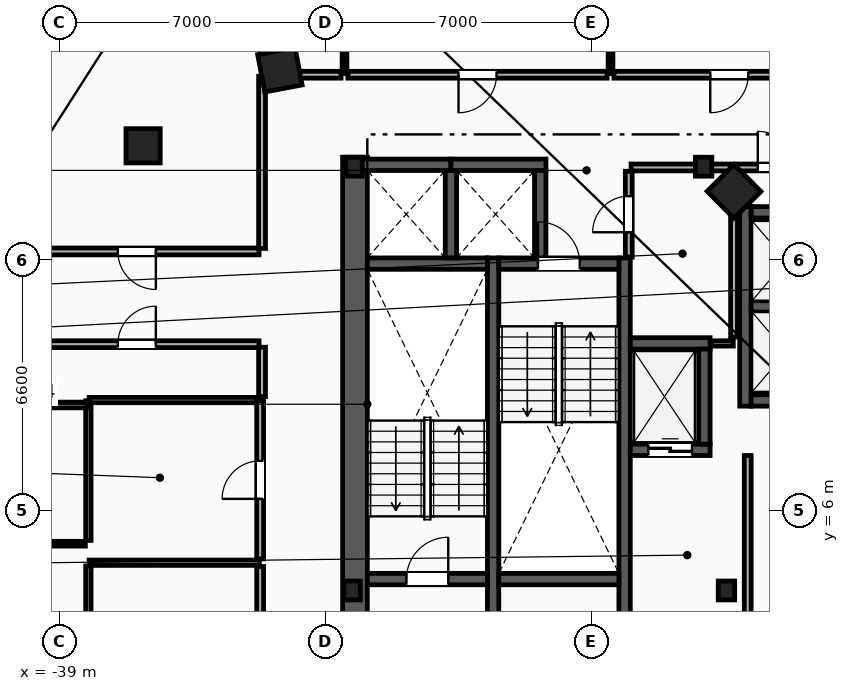
"""IFC4 building model, lengths in metres.
Left out: names, types, materials, properties, quantities, classifications, styles, units other than length and angle.
Written with IfcOpenShell. Run it as: python <this file> out.ifc"""

import sys

from ifc_helpers import new_model, si_unit, direction, frame, frame_2d, origin, origin_2d, place, context, subcontext, project, spatial, rectangle, i_section, extrude, element, fill, save


model = new_model("IFC4")
c1 = context("Model", 3, precision=1e-05, world=origin(), true_north=direction((0.0, 1.0)))
c2 = subcontext(c1, "Body", "Model", "MODEL_VIEW")
j1 = project(units=[si_unit("LENGTHUNIT", "METRE"), si_unit("PLANEANGLEUNIT", "RADIAN")], contexts=[c1])
p1 = place(None, origin())
s1 = spatial("IfcSite", under=j1, at=p1, CompositionType="ELEMENT")
p2 = place(p1, origin())
s2 = spatial("IfcBuilding", under=s1, at=p2, CompositionType="ELEMENT")
p3 = place(p2, frame((0.0, 0.0, 169.2)))
s3 = spatial("IfcBuildingStorey", under=s2, at=p3, CompositionType="ELEMENT", Elevation=169.2)
for number, where, z_axis, x_axis in (
    (1, (-31.3, 3.9, 0.0), (0.0, 0.0, 1.0), (1.0, 0.0, 0.0)),
    (2, (-21.45, 3.9, 0.0), (0.0, 0.0, 1.0), (1.0, 0.0, 0.0)),
    (3, (-22.05, 15.05, 0.0), (0.0, 0.0, 1.0), (1.0, 0.0, 0.0)),
    (4, (-31.25, 15.05, 0.0), (0.0, 0.0, 1.0), (1.0, 0.0, 0.0)),
):
    element("IfcColumn", number, at=place(p3, frame(where, z_axis=z_axis, x_axis=x_axis)), inside=s3, PredefinedType="COLUMN", context=c2, shape_type="SweptSolid", body=[
        extrude(i_section(OverallWidth=0.432, OverallDepth=0.498, WebThickness=0.056, FlangeThickness=0.089, FilletRadius=0.018, at=origin_2d()), origin(), (0.0, 0.0, 1.0), 3.6),
    ])
p4 = place(p3, frame((-36.8, 15.6, 0.0), z_axis=(0.0, 0.0, 1.0), x_axis=(1.0, 0.0, 0.0)))
e5 = element("IfcColumn", 5, at=p4, inside=s3, PredefinedType="COLUMN", context=c2, shape_type="SweptSolid", body=[
    extrude(rectangle(XDim=0.9, YDim=0.9, at=origin_2d()), origin(), (0.0, 0.0, 1.0), 3.6),
])
for number, where, z_axis, x_axis in (
    (6, (-21.25, 14.4, 0.0), (0.0, 0.0, 1.0), (-0.703, 0.711, 0.0)),
    (7, (-33.2, 17.6, 0.0), (0.0, 0.0, 1.0), (-0.983, -0.186, 0.0)),
):
    element("IfcColumn", number, at=place(p3, frame(where, z_axis=z_axis, x_axis=x_axis)), inside=s3, PredefinedType="COLUMN", context=c2, shape_type="SweptSolid", body=[
        extrude(rectangle(XDim=1.0, YDim=1.0, at=origin_2d()), origin(), (0.0, 0.0, 1.0), 3.6),
    ])
p5 = place(p3, frame((-31.225, 1.97, 0.0), z_axis=(0.0, 0.0, 1.0), x_axis=(0.0, 1.0, 0.0)))
e8 = element("IfcWall", 8, at=p5, inside=s3, PredefinedType="SHEAR", context=c2, shape_type="SweptSolid", body=[
    extrude(rectangle(XDim=13.33, YDim=0.65, at=frame_2d((6.665, 0.0))), origin(), (0.0, 0.0, 1.0), 3.36),
])
for number, where, z_axis, x_axis in (
    (9, (-27.59, 1.97, 0.0), (0.0, 0.0, 1.0), (0.0, 1.0, 0.0)),
    (10, (-24.13, 1.97, 0.0), (0.0, 0.0, 1.0), (0.0, 1.0, 0.0)),
):
    element("IfcWall", number, at=place(p3, frame(where, z_axis=z_axis, x_axis=x_axis)), inside=s3, PredefinedType="SHEAR", context=c2, shape_type="SweptSolid", body=[
        extrude(rectangle(XDim=10.68, YDim=0.3, at=frame_2d((5.34, 0.0))), origin(), (0.0, 0.0, 1.0), 3.36),
    ])
p6 = place(p3, frame((-30.9, 4.2, 0.0), z_axis=(0.0, 0.0, 1.0), x_axis=(1.0, 0.0, 0.0)))
e11 = element("IfcWall", 11, at=p6, inside=s3, PredefinedType="SHEAR", context=c2, shape_type="SweptSolid", body=[
    extrude(rectangle(XDim=3.16, YDim=0.3, at=frame_2d((1.58, 0.0))), origin(), (0.0, 0.0, 1.0), 3.36),
])
p7 = place(p6, frame((1.03, 0.0, 0.0)))
e12 = element("IfcOpeningElement", 12, at=p7, cuts=e11, PredefinedType="OPENING", context=c2, shape_type="SweptSolid", body=[
    extrude(rectangle(XDim=1.1, YDim=2.15, at=frame_2d((0.55, 1.075))), frame((0.0, 0.16, 0.0), z_axis=(0.0, -1.0, 0.0), x_axis=(1.0, 0.0, 0.0)), (0.0, 0.0, 1.0), 0.32),
])
p8 = place(p3, frame((-30.9, 12.5, 0.0), z_axis=(0.0, 0.0, 1.0), x_axis=(1.0, 0.0, 0.0)))
e13 = element("IfcWall", 13, at=p8, inside=s3, PredefinedType="SHEAR", context=c2, shape_type="SweptSolid", body=[
    extrude(rectangle(XDim=3.16, YDim=0.3, at=frame_2d((1.58, 0.0))), origin(), (0.0, 0.0, 1.0), 3.36),
])
p9 = place(p3, frame((-27.44, 12.5, 0.0), z_axis=(0.0, 0.0, 1.0), x_axis=(1.0, 0.0, 0.0)))
e14 = element("IfcWall", 14, at=p9, inside=s3, PredefinedType="SHEAR", context=c2, shape_type="SweptSolid", body=[
    extrude(rectangle(XDim=3.16, YDim=0.3, at=frame_2d((1.58, 0.0))), origin(), (0.0, 0.0, 1.0), 3.36),
])
p10 = place(p9, frame((1.03, 0.0, 0.0)))
e15 = element("IfcOpeningElement", 15, at=p10, cuts=e14, PredefinedType="OPENING", context=c2, shape_type="SweptSolid", body=[
    extrude(rectangle(XDim=1.1, YDim=2.15, at=frame_2d((0.55, 1.075))), frame((0.0, 0.16, 0.0), z_axis=(0.0, -1.0, 0.0), x_axis=(1.0, 0.0, 0.0)), (0.0, 0.0, 1.0), 0.32),
])
p11 = place(p3, frame((-27.44, 4.2, 0.0), z_axis=(0.0, 0.0, 1.0), x_axis=(1.0, 0.0, 0.0)))
e16 = element("IfcWall", 16, at=p11, inside=s3, PredefinedType="SHEAR", context=c2, shape_type="SweptSolid", body=[
    extrude(rectangle(XDim=3.16, YDim=0.3, at=frame_2d((1.58, 0.0))), origin(), (0.0, 0.0, 1.0), 3.36),
])
p12 = place(p3, frame((-20.89, 2.15, 0.0), z_axis=(0.0, 0.0, 1.0), x_axis=(0.0, 1.0, 0.0)))
e17 = element("IfcWall", 17, at=p12, inside=s3, PredefinedType="PARTITIONING", context=c2, shape_type="SweptSolid", body=[
    extrude(rectangle(XDim=5.3, YDim=0.18, at=frame_2d((2.65, 0.0))), origin(), (0.0, 0.0, 1.0), 3.36),
])
p13 = place(p3, frame((-23.98, 7.6, 0.0), z_axis=(0.0, 0.0, 1.0), x_axis=(1.0, 0.0, 0.0)))
e18 = element("IfcWall", 18, at=p13, inside=s3, PredefinedType="SHEAR", context=c2, shape_type="SweptSolid", body=[
    extrude(rectangle(XDim=2.1, YDim=0.3, at=frame_2d((1.05, 0.0))), origin(), (0.0, 0.0, 1.0), 3.36),
])
p14 = place(p13, frame((0.475, 0.0, 0.0)))
e19 = element("IfcOpeningElement", 19, at=p14, cuts=e18, PredefinedType="OPENING", context=c2, shape_type="SweptSolid", body=[
    extrude(rectangle(XDim=1.15, YDim=2.2, at=frame_2d((0.575, 1.1))), frame((0.0, 0.16, 0.0), z_axis=(0.0, -1.0, 0.0), x_axis=(1.0, 0.0, 0.0)), (0.0, 0.0, 1.0), 0.32),
])
p15 = place(p3, frame((-23.98, 10.4, 0.0), z_axis=(0.0, 0.0, 1.0), x_axis=(1.0, 0.0, 0.0)))
e20 = element("IfcWall", 20, at=p15, inside=s3, PredefinedType="SHEAR", context=c2, shape_type="SweptSolid", body=[
    extrude(rectangle(XDim=2.1, YDim=0.3, at=frame_2d((1.05, 0.0))), origin(), (0.0, 0.0, 1.0), 3.36),
])
for number, where, z_axis, x_axis in (
    (21, (-22.03, 7.75, 0.0), (0.0, 0.0, 1.0), (0.0, 1.0, 0.0)),
    (22, (-31.2, 15.1, 0.0), (0.0, 0.0, 1.0), (1.0, 0.0, 0.0)),
):
    element("IfcWall", number, at=place(p3, frame(where, z_axis=z_axis, x_axis=x_axis)), inside=s3, PredefinedType="SHEAR", context=c2, shape_type="SweptSolid", body=[
        extrude(rectangle(XDim=2.5, YDim=0.3, at=frame_2d((1.25, 0.0))), origin(), (0.0, 0.0, 1.0), 3.36),
    ])
p16 = place(p3, frame((-28.7, 12.65, 0.0), z_axis=(0.0, 0.0, 1.0), x_axis=(0.0, 1.0, 0.0)))
e23 = element("IfcWall", 23, at=p16, inside=s3, PredefinedType="SHEAR", context=c2, shape_type="SweptSolid", body=[
    extrude(rectangle(XDim=2.3, YDim=0.3, at=frame_2d((1.15, 0.0))), origin(), (0.0, 0.0, 1.0), 3.36),
])
p17 = place(p3, frame((-28.7, 15.1, 0.0), z_axis=(0.0, 0.0, 1.0), x_axis=(1.0, 0.0, 0.0)))
e24 = element("IfcWall", 24, at=p17, inside=s3, PredefinedType="SHEAR", context=c2, shape_type="SweptSolid", body=[
    extrude(rectangle(XDim=2.5, YDim=0.3, at=frame_2d((1.25, 0.0))), origin(), (0.0, 0.0, 1.0), 3.36),
])
p18 = place(p3, frame((-26.35, 12.65, 0.0), z_axis=(0.0, 0.0, 1.0), x_axis=(0.0, 1.0, 0.0)))
e25 = element("IfcWall", 25, at=p18, inside=s3, PredefinedType="SHEAR", context=c2, shape_type="SweptSolid", body=[
    extrude(rectangle(XDim=2.3, YDim=0.3, at=frame_2d((1.15, 0.0))), origin(), (0.0, 0.0, 1.0), 3.36),
])
p19 = place(p3, frame((-20.95, 8.75, 0.0), z_axis=(0.0, 0.0, 1.0), x_axis=(0.0, 1.0, 0.0)))
e26 = element("IfcWall", 26, at=p19, inside=s3, PredefinedType="SHEAR", context=c2, shape_type="SweptSolid", body=[
    extrude(rectangle(XDim=5.25, YDim=0.3, at=frame_2d((2.625, 0.0))), origin(), (0.0, 0.0, 1.0), 3.36),
])
for number, where, z_axis, x_axis in (
    (27, (-20.8, 8.9, 0.0), (0.0, 0.0, 1.0), (1.0, 0.0, 0.0)),
    (28, (-20.8, 13.85, 0.0), (0.0, 0.0, 1.0), (1.0, 0.0, 0.0)),
):
    element("IfcWall", number, at=place(p3, frame(where, z_axis=z_axis, x_axis=x_axis)), inside=s3, PredefinedType="SHEAR", context=c2, shape_type="SweptSolid", body=[
        extrude(rectangle(XDim=2.15, YDim=0.3, at=frame_2d((1.075, 0.0))), origin(), (0.0, 0.0, 1.0), 3.36),
    ])
p20 = place(p3, frame((-20.8, 11.375, 0.0), z_axis=(0.0, 0.0, 1.0), x_axis=(1.0, 0.0, 0.0)))
e29 = element("IfcWall", 29, at=p20, inside=s3, PredefinedType="SHEAR", context=c2, shape_type="SweptSolid", body=[
    extrude(rectangle(XDim=1.85, YDim=0.3, at=frame_2d((0.925, 0.0))), origin(), (0.0, 0.0, 1.0), 3.36),
])
p21 = place(p3, frame((-21.23, 15.03, 0.0), z_axis=(0.0, 0.0, 1.0), x_axis=(1.0, 0.0, 0.0)))
e30 = element("IfcWall", 30, at=p21, inside=s3, PredefinedType="PARTITIONING", context=c2, shape_type="SweptSolid", body=[
    extrude(rectangle(XDim=2.16, YDim=0.18, at=frame_2d((1.08, 0.0))), origin(), (0.0, 0.0, 1.0), 3.36),
])
p22 = place(p21, frame((0.605, 0.0, 0.0)))
e31 = element("IfcOpeningElement", 31, at=p22, cuts=e30, PredefinedType="OPENING", context=c2, shape_type="SweptSolid", body=[
    extrude(rectangle(XDim=0.95, YDim=2.1, at=frame_2d((0.475, 1.05))), frame((0.0, 0.1, 0.0), z_axis=(0.0, -1.0, 0.0), x_axis=(1.0, 0.0, 0.0)), (0.0, 0.0, 1.0), 0.2),
])
p23 = place(p3, frame((-21.86, 10.4, 0.0), z_axis=(0.0, 0.0, 1.0), x_axis=(1.0, 0.0, 0.0)))
e32 = element("IfcWall", 32, at=p23, inside=s3, PredefinedType="PARTITIONING", context=c2, shape_type="SweptSolid", body=[
    extrude(rectangle(XDim=0.59, YDim=0.14, at=frame_2d((0.295, 0.0))), origin(), (0.0, 0.0, 1.0), 3.36),
])
p24 = place(p3, frame((-21.25, 10.57, 0.0), z_axis=(0.0, 0.0, 1.0), x_axis=(0.0, 1.0, 0.0)))
e33 = element("IfcWall", 33, at=p24, inside=s3, PredefinedType="PARTITIONING", context=c2, shape_type="SweptSolid", body=[
    extrude(rectangle(XDim=4.36, YDim=0.18, at=frame_2d((2.18, 0.0))), origin(), (0.0, 0.0, 1.0), 3.36),
])
p25 = place(p3, frame((-23.96, 15.03, 0.0), z_axis=(0.0, 0.0, 1.0), x_axis=(1.0, 0.0, 0.0)))
e34 = element("IfcWall", 34, at=p25, inside=s3, PredefinedType="PARTITIONING", context=c2, shape_type="SweptSolid", body=[
    extrude(rectangle(XDim=2.61, YDim=0.18, at=frame_2d((1.305, 0.0))), origin(), (0.0, 0.0, 1.0), 2.433),
])
p26 = place(p3, frame((-24.02, 12.67, 0.0), z_axis=(0.0, 0.0, 1.0), x_axis=(0.0, 1.0, 0.0)))
e35 = element("IfcWall", 35, at=p26, inside=s3, PredefinedType="PARTITIONING", context=c2, shape_type="SweptSolid", body=[
    extrude(rectangle(XDim=2.26, YDim=0.18, at=frame_2d((1.13, 0.0))), origin(), (0.0, 0.0, 1.0), 3.36),
])
p27 = place(p26, frame((0.655, 0.0, 0.0)))
e36 = element("IfcOpeningElement", 36, at=p27, cuts=e35, PredefinedType="OPENING", context=c2, shape_type="SweptSolid", body=[
    extrude(rectangle(XDim=0.95, YDim=2.1, at=frame_2d((0.475, 1.05))), frame((0.0, 0.1, 0.0), z_axis=(0.0, -1.0, 0.0), x_axis=(1.0, 0.0, 0.0)), (0.0, 0.0, 1.0), 0.2),
])
p28 = place(p3, frame((-38.24, 1.615, 0.0), z_axis=(0.0, 0.0, 1.0), x_axis=(0.0, 1.0, 0.0)))
e37 = element("IfcWall", 37, at=p28, inside=s3, PredefinedType="PARTITIONING", context=c2, shape_type="SweptSolid", body=[
    extrude(rectangle(XDim=2.93, YDim=0.14, at=frame_2d((1.465, 0.0))), origin(), (0.0, 0.0, 1.0), 3.36),
])
p29 = place(p3, frame((-38.24, 5.215, 0.0), z_axis=(0.0, 0.0, 1.0), x_axis=(0.0, 1.0, 0.0)))
e38 = element("IfcWall", 38, at=p29, inside=s3, PredefinedType="PARTITIONING", context=c2, shape_type="SweptSolid", body=[
    extrude(rectangle(XDim=3.675, YDim=0.14, at=frame_2d((1.837, 0.0))), origin(), (0.0, 0.0, 1.0), 3.36),
])
for number, where, z_axis, x_axis in (
    (39, (-38.22, 4.63, 0.0), (0.0, 0.0, 1.0), (1.0, 0.0, 0.0)),
    (40, (-38.22, 8.91, 0.0), (0.0, 0.0, 1.0), (1.0, 0.0, 0.0)),
):
    element("IfcWall", number, at=place(p3, frame(where, z_axis=z_axis, x_axis=x_axis)), inside=s3, PredefinedType="PARTITIONING", context=c2, shape_type="SweptSolid", body=[
        extrude(rectangle(XDim=4.48, YDim=0.14, at=frame_2d((2.24, 0.0))), origin(), (0.0, 0.0, 1.0), 3.36),
    ])
p30 = place(p3, frame((-33.72, 0.27, 0.0), z_axis=(0.0, 0.0, 1.0), x_axis=(0.0, 1.0, 0.0)))
e41 = element("IfcWall", 41, at=p30, inside=s3, PredefinedType="PARTITIONING", context=c2, shape_type="SweptSolid", body=[
    extrude(rectangle(XDim=4.26, YDim=0.18, at=frame_2d((2.13, 0.0))), origin(), (0.0, 0.0, 1.0), 3.36),
])
p31 = place(p30, frame((1.655, 0.0, 0.0)))
e42 = element("IfcOpeningElement", 42, at=p31, cuts=e41, PredefinedType="OPENING", context=c2, shape_type="SweptSolid", body=[
    extrude(rectangle(XDim=0.95, YDim=2.1, at=frame_2d((0.475, 1.05))), frame((0.0, 0.1, 0.0), z_axis=(0.0, -1.0, 0.0), x_axis=(1.0, 0.0, 0.0)), (0.0, 0.0, 1.0), 0.2),
])
p32 = place(p3, frame((-33.72, 4.73, 0.0), z_axis=(0.0, 0.0, 1.0), x_axis=(0.0, 1.0, 0.0)))
e43 = element("IfcWall", 43, at=p32, inside=s3, PredefinedType="PARTITIONING", context=c2, shape_type="SweptSolid", body=[
    extrude(rectangle(XDim=4.16, YDim=0.18, at=frame_2d((2.08, 0.0))), origin(), (0.0, 0.0, 1.0), 3.36),
])
p33 = place(p32, frame((1.58, 0.0, 0.0)))
e44 = element("IfcOpeningElement", 44, at=p33, cuts=e43, PredefinedType="OPENING", context=c2, shape_type="SweptSolid", body=[
    extrude(rectangle(XDim=1.0, YDim=2.15, at=frame_2d((0.5, 1.075))), frame((0.0, 0.1, 0.0), z_axis=(0.0, -1.0, 0.0), x_axis=(1.0, 0.0, 0.0)), (0.0, 0.0, 1.0), 0.2),
])
p34 = place(p3, frame((-50.115, 8.78, 0.0), z_axis=(0.0, 0.0, 1.0), x_axis=(1.0, 0.0, 0.0)))
e45 = element("IfcWall", 45, at=p34, inside=s3, PredefinedType="PARTITIONING", context=c2, shape_type="SweptSolid", body=[
    extrude(rectangle(XDim=11.845, YDim=0.15, at=frame_2d((5.922, 0.0))), origin(), (0.0, 0.0, 1.0), 3.36),
])
p35 = place(p3, frame((-31.5, 17.5, 0.0), z_axis=(0.0, 0.0, 1.0), x_axis=(0.0, 1.0, 0.0)))
e46 = element("IfcWall", 46, at=p35, inside=s3, PredefinedType="PARTITIONING", context=c2, shape_type="SweptSolid", body=[
    extrude(rectangle(XDim=5.902, YDim=0.125, at=frame_2d((2.951, 0.0))), origin(), (0.0, 0.0, 1.0), 3.36),
])
p36 = place(p3, frame((-24.5, 17.5, 0.0), z_axis=(0.0, 0.0, 1.0), x_axis=(0.0, 1.0, 0.0)))
e47 = element("IfcWall", 47, at=p36, inside=s3, PredefinedType="PARTITIONING", context=c2, shape_type="SweptSolid", body=[
    extrude(rectangle(XDim=4.525, YDim=0.125, at=frame_2d((2.263, 0.0))), origin(), (0.0, 0.0, 1.0), 3.36),
])
p37 = place(p3, frame((-40.178, 10.38, 0.0), z_axis=(0.0, 0.0, 1.0), x_axis=(1.0, 0.0, 0.0)))
e48 = element("IfcWall", 48, at=p37, inside=s3, PredefinedType="PARTITIONING", context=c2, shape_type="SweptSolid", body=[
    extrude(rectangle(XDim=6.428, YDim=0.18, at=frame_2d((3.214, 0.0))), origin(), (0.0, 0.0, 1.0), 3.36),
])
p38 = place(p37, frame((2.714, 0.0, 0.0)))
e49 = element("IfcOpeningElement", 49, at=p38, cuts=e48, PredefinedType="OPENING", context=c2, shape_type="SweptSolid", body=[
    extrude(rectangle(XDim=1.0, YDim=2.15, at=frame_2d((0.5, 1.075))), frame((0.0, 0.1, 0.0), z_axis=(0.0, -1.0, 0.0), x_axis=(1.0, 0.0, 0.0)), (0.0, 0.0, 1.0), 0.2),
])
p39 = place(p3, frame((-33.67, 10.3, 0.0), z_axis=(0.0, 0.0, 1.0), x_axis=(0.0, -1.0, 0.0)))
e50 = element("IfcWall", 50, at=p39, inside=s3, PredefinedType="PARTITIONING", context=c2, shape_type="SweptSolid", body=[
    extrude(rectangle(XDim=1.299, YDim=0.18, at=frame_2d((0.649, 0.0))), origin(), (0.0, 0.0, 1.0), 3.36),
])
p40 = place(p3, frame((-33.75, 12.82, 0.0), z_axis=(0.0, 0.0, 1.0), x_axis=(-1.0, 0.0, 0.0)))
e51 = element("IfcWall", 51, at=p40, inside=s3, PredefinedType="PARTITIONING", context=c2, shape_type="SweptSolid", body=[
    extrude(rectangle(XDim=6.428, YDim=0.18, at=frame_2d((3.214, 0.0))), origin(), (0.0, 0.0, 1.0), 3.36),
])
p41 = place(p40, frame((2.714, 0.0, 0.0)))
e52 = element("IfcOpeningElement", 52, at=p41, cuts=e51, PredefinedType="OPENING", context=c2, shape_type="SweptSolid", body=[
    extrude(rectangle(XDim=1.0, YDim=2.15, at=frame_2d((0.5, 1.075))), frame((0.0, 0.1, 0.0), z_axis=(0.0, -1.0, 0.0), x_axis=(1.0, 0.0, 0.0)), (0.0, 0.0, 1.0), 0.2),
])
p42 = place(p3, frame((-33.67, 17.428, 0.0), z_axis=(0.0, 0.0, 1.0), x_axis=(0.0, -1.0, 0.0)))
e53 = element("IfcWall", 53, at=p42, inside=s3, PredefinedType="PARTITIONING", context=c2, shape_type="SweptSolid", body=[
    extrude(rectangle(XDim=4.529, YDim=0.18, at=frame_2d((2.264, 0.0))), origin(), (0.0, 0.0, 1.0), 3.36),
])
p43 = place(p3, frame((-31.59, 17.47, 0.0), z_axis=(0.0, 0.0, 1.0), x_axis=(-1.0, 0.0, 0.0)))
e54 = element("IfcWall", 54, at=p43, inside=s3, PredefinedType="PARTITIONING", context=c2, shape_type="SweptSolid", body=[
    extrude(rectangle(XDim=2.038, YDim=0.18, at=frame_2d((1.019, 0.0))), origin(), (0.0, 0.0, 1.0), 3.36),
])
p44 = place(p3, frame((-18.342, 17.47, 0.0), z_axis=(0.0, 0.0, 1.0), x_axis=(-1.0, 0.0, 0.0)))
e55 = element("IfcWall", 55, at=p44, inside=s3, PredefinedType="PARTITIONING", context=c2, shape_type="SweptSolid", body=[
    extrude(rectangle(XDim=6.068, YDim=0.18, at=frame_2d((3.034, 0.0))), origin(), (0.0, 0.0, 1.0), 3.36),
])
p45 = place(p44, frame((2.534, 0.0, 0.0)))
e56 = element("IfcOpeningElement", 56, at=p45, cuts=e55, PredefinedType="OPENING", context=c2, shape_type="SweptSolid", body=[
    extrude(rectangle(XDim=1.0, YDim=2.15, at=frame_2d((0.5, 1.075))), frame((0.0, 0.1, 0.0), z_axis=(0.0, -1.0, 0.0), x_axis=(1.0, 0.0, 0.0)), (0.0, 0.0, 1.0), 0.2),
])
p46 = place(p3, frame((-24.59, 17.47, 0.0), z_axis=(0.0, 0.0, 1.0), x_axis=(-1.0, 0.0, 0.0)))
e57 = element("IfcWall", 57, at=p46, inside=s3, PredefinedType="PARTITIONING", context=c2, shape_type="SweptSolid", body=[
    extrude(rectangle(XDim=6.82, YDim=0.18, at=frame_2d((3.41, 0.0))), origin(), (0.0, 0.0, 1.0), 3.36),
])
p47 = place(p46, frame((2.91, 0.0, 0.0)))
e58 = element("IfcOpeningElement", 58, at=p47, cuts=e57, PredefinedType="OPENING", context=c2, shape_type="SweptSolid", body=[
    extrude(rectangle(XDim=1.0, YDim=2.15, at=frame_2d((0.5, 1.075))), frame((0.0, 0.1, 0.0), z_axis=(0.0, -1.0, 0.0), x_axis=(1.0, 0.0, 0.0)), (0.0, 0.0, 1.0), 0.2),
])
p48 = place(p3, frame((-38.32, 5.13, 0.0), z_axis=(0.0, 0.0, 1.0), x_axis=(-1.0, 0.0, 0.0)))
e59 = element("IfcWall", 59, at=p48, inside=s3, PredefinedType="PARTITIONING", context=c2, shape_type="SweptSolid", body=[
    extrude(rectangle(XDim=12.369, YDim=0.125, at=frame_2d((6.184, 0.0))), origin(), (0.0, 0.0, 1.0), 3.36),
])
p49 = place(p48, frame((5.684, 0.0, 0.0)))
e60 = element("IfcOpeningElement", 60, at=p49, cuts=e59, PredefinedType="OPENING", context=c2, shape_type="SweptSolid", body=[
    extrude(rectangle(XDim=1.0, YDim=2.15, at=frame_2d((0.5, 1.075))), frame((0.0, 0.073, 0.0), z_axis=(0.0, -1.0, 0.0), x_axis=(1.0, 0.0, 0.0)), (0.0, 0.0, 1.0), 0.145),
])
p50 = place(p7, origin())
e61 = element("IfcDoor", 61, at=p50, inside=s3, OperationType="SINGLE_SWING_RIGHT", PredefinedType="DOOR", context=c2, shape_type="SweptSolid", body=[
    extrude(rectangle(XDim=1.1, YDim=2.15, at=frame_2d((0.55, 1.075))), frame((0.0, 0.025, 0.0), z_axis=(0.0, -1.0, 0.0), x_axis=(1.0, 0.0, 0.0)), (0.0, 0.0, 1.0), 0.05),
])
fill(e12, e61)
p51 = place(p10, origin())
e62 = element("IfcDoor", 62, at=p51, inside=s3, OperationType="SINGLE_SWING_LEFT", PredefinedType="DOOR", context=c2, shape_type="SweptSolid", body=[
    extrude(rectangle(XDim=1.1, YDim=2.15, at=frame_2d((0.55, 1.075))), frame((0.0, 0.025, 0.0), z_axis=(0.0, -1.0, 0.0), x_axis=(1.0, 0.0, 0.0)), (0.0, 0.0, 1.0), 0.05),
])
fill(e15, e62)
p52 = place(p14, origin())
e63 = element("IfcDoor", 63, at=p52, inside=s3, OperationType="SLIDING_TO_LEFT", PredefinedType="TRAPDOOR", context=c2, shape_type="SweptSolid", body=[
    extrude(rectangle(XDim=1.15, YDim=2.2, at=frame_2d((0.575, 1.1))), frame((0.0, 0.025, 0.0), z_axis=(0.0, -1.0, 0.0), x_axis=(1.0, 0.0, 0.0)), (0.0, 0.0, 1.0), 0.05),
])
fill(e19, e63)
p53 = place(p47, origin())
e64 = element("IfcDoor", 64, at=p53, inside=s3, OperationType="SINGLE_SWING_RIGHT", PredefinedType="DOOR", context=c2, shape_type="SweptSolid", body=[
    extrude(rectangle(XDim=1.0, YDim=2.15, at=frame_2d((0.5, 1.075))), frame((0.0, 0.025, 0.0), z_axis=(0.0, -1.0, 0.0), x_axis=(1.0, 0.0, 0.0)), (0.0, 0.0, 1.0), 0.05),
])
fill(e58, e64)
p54 = place(p38, origin())
e65 = element("IfcDoor", 65, at=p54, inside=s3, OperationType="SINGLE_SWING_RIGHT", PredefinedType="DOOR", context=c2, shape_type="SweptSolid", body=[
    extrude(rectangle(XDim=1.0, YDim=2.15, at=frame_2d((0.5, 1.075))), frame((0.0, 0.025, 0.0), z_axis=(0.0, -1.0, 0.0), x_axis=(1.0, 0.0, 0.0)), (0.0, 0.0, 1.0), 0.05),
])
fill(e49, e65)
p55 = place(p41, origin())
e66 = element("IfcDoor", 66, at=p55, inside=s3, OperationType="SINGLE_SWING_LEFT", PredefinedType="DOOR", context=c2, shape_type="SweptSolid", body=[
    extrude(rectangle(XDim=1.0, YDim=2.15, at=frame_2d((0.5, 1.075))), frame((0.0, 0.025, 0.0), z_axis=(0.0, -1.0, 0.0), x_axis=(1.0, 0.0, 0.0)), (0.0, 0.0, 1.0), 0.05),
])
fill(e52, e66)
p56 = place(p45, origin())
e67 = element("IfcDoor", 67, at=p56, inside=s3, OperationType="SINGLE_SWING_RIGHT", PredefinedType="DOOR", context=c2, shape_type="SweptSolid", body=[
    extrude(rectangle(XDim=1.0, YDim=2.15, at=frame_2d((0.5, 1.075))), frame((0.0, 0.025, 0.0), z_axis=(0.0, -1.0, 0.0), x_axis=(1.0, 0.0, 0.0)), (0.0, 0.0, 1.0), 0.05),
])
fill(e56, e67)
p57 = place(p33, origin())
e68 = element("IfcDoor", 68, at=p57, inside=s3, OperationType="SINGLE_SWING_LEFT", PredefinedType="DOOR", context=c2, shape_type="SweptSolid", body=[
    extrude(rectangle(XDim=1.0, YDim=2.15, at=frame_2d((0.5, 1.075))), frame((0.0, 0.025, 0.0), z_axis=(0.0, -1.0, 0.0), x_axis=(1.0, 0.0, 0.0)), (0.0, 0.0, 1.0), 0.05),
])
fill(e44, e68)
p58 = place(p27, origin())
e69 = element("IfcDoor", 69, at=p58, inside=s3, OperationType="SINGLE_SWING_LEFT", PredefinedType="DOOR", context=c2, shape_type="SweptSolid", body=[
    extrude(rectangle(XDim=0.95, YDim=2.1, at=frame_2d((0.475, 1.05))), frame((0.0, 0.025, 0.0), z_axis=(0.0, -1.0, 0.0), x_axis=(1.0, 0.0, 0.0)), (0.0, 0.0, 1.0), 0.05),
])
fill(e36, e69)
p59 = place(p22, origin())
e70 = element("IfcDoor", 70, at=p59, inside=s3, OperationType="SINGLE_SWING_LEFT", PredefinedType="DOOR", context=c2, shape_type="SweptSolid", body=[
    extrude(rectangle(XDim=0.95, YDim=2.1, at=frame_2d((0.475, 1.05))), frame((0.0, 0.025, 0.0), z_axis=(0.0, -1.0, 0.0), x_axis=(1.0, 0.0, 0.0)), (0.0, 0.0, 1.0), 0.05),
])
fill(e31, e70)
save(model, sys.argv[1])
